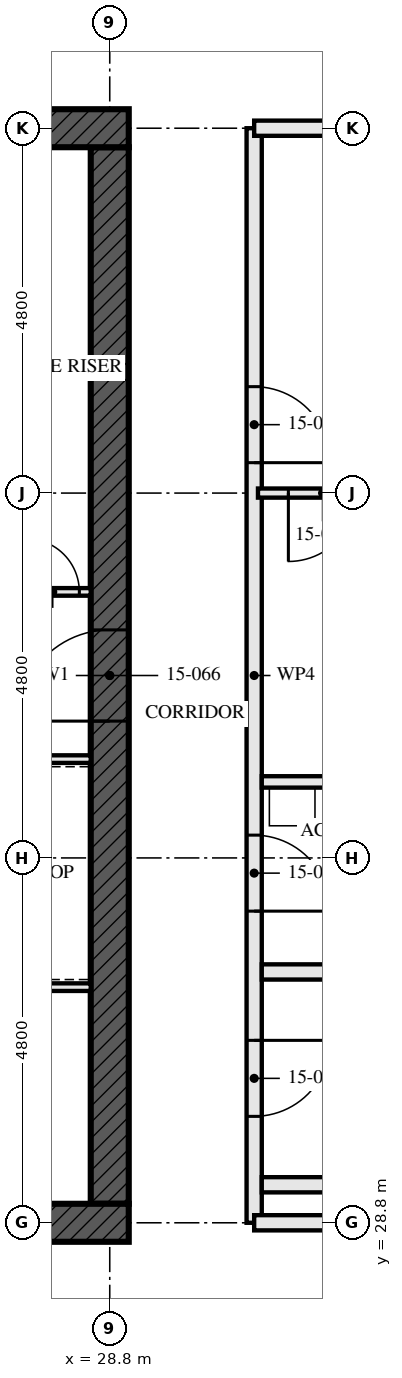
"""IFC4 building model, lengths in metres.
Left out: names, types, materials, properties, quantities, classifications, styles, units other than length and angle.
Written with IfcOpenShell. Run it as: python <this file> out.ifc"""

import sys

from ifc_helpers import new_model, si_unit, direction, frame, frame_2d, origin, place, context, subcontext, project, spatial, rectangle, extrude, element, fill, save


model = new_model("IFC4")
c1 = context("Model", 3, precision=1e-05, world=origin(), true_north=direction((0.0, 1.0)))
c2 = subcontext(c1, "Body", "Model", "MODEL_VIEW")
j1 = project(units=[si_unit("LENGTHUNIT", "METRE"), si_unit("PLANEANGLEUNIT", "RADIAN")], contexts=[c1])
p1 = place(None, origin())
s1 = spatial("IfcSite", under=j1, at=p1, CompositionType="ELEMENT")
p2 = place(p1, origin())
s2 = spatial("IfcBuilding", under=s1, at=p2, CompositionType="ELEMENT")
p3 = place(p2, frame((0.0, 0.0, 58.5)))
s3 = spatial("IfcBuildingStorey", under=s2, at=p3, CompositionType="ELEMENT", Elevation=58.5)
p4 = place(p3, frame((14.15, 28.8, -0.17), z_axis=(0.0, 0.0, 1.0), x_axis=(1.0, 0.0, 0.0)))
e1 = element("IfcWall", 1, at=p4, inside=s3, PredefinedType="SHEAR", context=c2, shape_type="SweptSolid", body=[
    extrude(rectangle(XDim=14.9, YDim=0.5, at=frame_2d((7.45, 0.0))), origin(), (0.0, 0.0, 1.0), 3.5),
])
p5 = place(p4, frame((6.85, 0.0, 0.17)))
e2 = element("IfcOpeningElement", 2, at=p5, cuts=e1, PredefinedType="OPENING", context=c2, shape_type="SweptSolid", body=[
    extrude(rectangle(XDim=1.2, YDim=2.1, at=frame_2d((0.6, 1.05))), frame((0.0, 0.26, 0.0), z_axis=(0.0, -1.0, 0.0), x_axis=(1.0, 0.0, 0.0)), (0.0, 0.0, 1.0), 0.521),
])
p6 = place(p3, frame((29.05, 43.2, -0.17), z_axis=(0.0, 0.0, 1.0), x_axis=(-1.0, 0.0, 0.0)))
e3 = element("IfcWall", 3, at=p6, inside=s3, PredefinedType="SHEAR", context=c2, shape_type="SweptSolid", body=[
    extrude(rectangle(XDim=14.9, YDim=0.5, at=frame_2d((7.45, 0.0))), origin(), (0.0, 0.0, 1.0), 3.5),
])
p7 = place(p6, frame((6.85, 0.0, 0.17)))
e4 = element("IfcOpeningElement", 4, at=p7, cuts=e3, PredefinedType="OPENING", context=c2, shape_type="SweptSolid", body=[
    extrude(rectangle(XDim=1.2, YDim=2.1, at=frame_2d((0.6, 1.05))), frame((0.0, 0.26, 0.0), z_axis=(0.0, -1.0, 0.0), x_axis=(1.0, 0.0, 0.0)), (0.0, 0.0, 1.0), 0.521),
])
p8 = place(p3, frame((28.8, 29.05, -0.17), z_axis=(0.0, 0.0, 1.0), x_axis=(0.0, 1.0, 0.0)))
e5 = element("IfcWall", 5, at=p8, inside=s3, PredefinedType="SHEAR", context=c2, shape_type="SweptSolid", body=[
    extrude(rectangle(XDim=13.9, YDim=0.5, at=frame_2d((6.95, 0.0))), origin(), (0.0, 0.0, 1.0), 3.5),
])
p9 = place(p8, frame((6.35, 0.0, 0.17)))
e6 = element("IfcOpeningElement", 6, at=p9, cuts=e5, PredefinedType="OPENING", context=c2, shape_type="SweptSolid", body=[
    extrude(rectangle(XDim=1.2, YDim=2.1, at=frame_2d((0.6, 1.05))), frame((0.0, 0.26, 0.0), z_axis=(0.0, -1.0, 0.0), x_axis=(1.0, 0.0, 0.0)), (0.0, 0.0, 1.0), 0.521),
])
for number, where, z_axis, x_axis in (
    (7, (35.5, 29.3, 0.0), (0.0, 0.0, 1.0), (-1.0, 0.0, 0.0)),
    (8, (35.5, 32.1, 0.0), (0.0, 0.0, 1.0), (-1.0, 0.0, 0.0)),
):
    element("IfcWall", number, at=place(p3, frame(where, z_axis=z_axis, x_axis=x_axis)), inside=s3, PredefinedType="SOLIDWALL", context=c2, shape_type="SweptSolid", body=[
        extrude(rectangle(XDim=4.7, YDim=0.2, at=frame_2d((2.35, 0.0))), origin(), (0.0, 0.0, 1.0), 2.99),
    ])
p10 = place(p3, frame((33.8, 34.6, 0.0), z_axis=(0.0, 0.0, 1.0), x_axis=(-1.0, 0.0, 0.0)))
e9 = element("IfcWall", 9, at=p10, inside=s3, PredefinedType="PARTITIONING", context=c2, shape_type="SweptSolid", body=[
    extrude(rectangle(XDim=3.0, YDim=0.15, at=frame_2d((1.5, 0.0))), origin(), (0.0, 0.0, 1.0), 3.33),
])
p11 = place(p3, frame((35.4, 38.4, 0.0), z_axis=(0.0, 0.0, 1.0), x_axis=(-1.0, 0.0, 0.0)))
e10 = element("IfcWall", 10, at=p11, inside=s3, PredefinedType="PARTITIONING", context=c2, shape_type="SweptSolid", body=[
    extrude(rectangle(XDim=4.65, YDim=0.12, at=frame_2d((2.325, 0.0))), origin(), (0.0, 0.0, 1.0), 2.55),
])
p12 = place(p11, frame((3.35, 0.0, 0.0)))
e11 = element("IfcOpeningElement", 11, at=p12, cuts=e10, PredefinedType="OPENING", context=c2, shape_type="SweptSolid", body=[
    extrude(rectangle(XDim=0.9, YDim=2.1, at=frame_2d((0.45, 1.05))), frame((0.0, 0.071, 0.0), z_axis=(0.0, -1.0, 0.0), x_axis=(1.0, 0.0, 0.0)), (0.0, 0.0, 1.0), 0.141),
])
p13 = place(p3, frame((30.7, 28.8, 0.0), z_axis=(0.0, 0.0, 1.0), x_axis=(0.0, 1.0, 0.0)))
e12 = element("IfcWall", 12, at=p13, inside=s3, PredefinedType="PARTITIONING", context=c2, shape_type="SweptSolid", body=[
    extrude(rectangle(XDim=14.4, YDim=0.2, at=frame_2d((7.2, 0.0))), origin(), (0.0, 0.0, 1.0), 2.55),
])
p14 = place(p13, frame((1.4, 0.0, 0.0)))
e13 = element("IfcOpeningElement", 13, at=p14, cuts=e12, PredefinedType="OPENING", context=c2, shape_type="SweptSolid", body=[
    extrude(rectangle(XDim=1.0, YDim=2.1, at=frame_2d((0.5, 1.05))), frame((0.0, 0.111, 0.0), z_axis=(0.0, -1.0, 0.0), x_axis=(1.0, 0.0, 0.0)), (0.0, 0.0, 1.0), 0.221),
])
p15 = place(p13, frame((4.1, 0.0, 0.0)))
e14 = element("IfcOpeningElement", 14, at=p15, cuts=e12, PredefinedType="OPENING", context=c2, shape_type="SweptSolid", body=[
    extrude(rectangle(XDim=1.0, YDim=2.1, at=frame_2d((0.5, 1.05))), frame((0.0, 0.111, 0.0), z_axis=(0.0, -1.0, 0.0), x_axis=(1.0, 0.0, 0.0)), (0.0, 0.0, 1.0), 0.221),
])
p16 = place(p13, frame((10.0, 0.0, 0.0)))
e15 = element("IfcOpeningElement", 15, at=p16, cuts=e12, PredefinedType="OPENING", context=c2, shape_type="SweptSolid", body=[
    extrude(rectangle(XDim=1.0, YDim=2.1, at=frame_2d((0.5, 1.05))), frame((0.0, 0.111, 0.0), z_axis=(0.0, -1.0, 0.0), x_axis=(1.0, 0.0, 0.0)), (0.0, 0.0, 1.0), 0.221),
])
p17 = place(p3, frame((23.05, 34.9, 0.0), z_axis=(0.0, 0.0, 1.0), x_axis=(1.0, 0.0, 0.0)))
e16 = element("IfcWall", 16, at=p17, inside=s3, PredefinedType="SOLIDWALL", context=c2, shape_type="SweptSolid", body=[
    extrude(rectangle(XDim=5.5, YDim=0.1, at=frame_2d((2.75, 0.0))), origin(), (0.0, 0.0, 1.0), 3.33),
])
p18 = place(p3, frame((22.65, 37.1, 0.0), z_axis=(0.0, 0.0, 1.0), x_axis=(1.0, 0.0, 0.0)))
e17 = element("IfcWall", 17, at=p18, inside=s3, PredefinedType="SOLIDWALL", context=c2, shape_type="SweptSolid", body=[
    extrude(rectangle(XDim=5.9, YDim=0.1, at=frame_2d((2.95, 0.0))), origin(), (0.0, 0.0, 1.0), 3.33),
])
p19 = place(p18, frame((3.5, 0.0, 0.0)))
e18 = element("IfcOpeningElement", 18, at=p19, cuts=e17, PredefinedType="OPENING", context=c2, shape_type="SweptSolid", body=[
    extrude(rectangle(XDim=0.9, YDim=2.1, at=frame_2d((0.45, 1.05))), frame((0.0, 0.061, 0.0), z_axis=(0.0, -1.0, 0.0), x_axis=(1.0, 0.0, 0.0)), (0.0, 0.0, 1.0), 0.121),
])
p20 = place(p18, frame((5.05, 0.0, 0.0)))
e19 = element("IfcOpeningElement", 19, at=p20, cuts=e17, PredefinedType="OPENING", context=c2, shape_type="SweptSolid", body=[
    extrude(rectangle(XDim=0.7, YDim=2.1, at=frame_2d((0.35, 1.05))), frame((0.0, 0.061, 0.0), z_axis=(0.0, -1.0, 0.0), x_axis=(1.0, 0.0, 0.0)), (0.0, 0.0, 1.0), 0.121),
])
p21 = place(p3, frame((23.15, 31.9, 0.0), z_axis=(0.0, 0.0, 1.0), x_axis=(1.0, 0.0, 0.0)))
e20 = element("IfcWall", 20, at=p21, inside=s3, PredefinedType="SOLIDWALL", context=c2, shape_type="SweptSolid", body=[
    extrude(rectangle(XDim=5.4, YDim=0.1, at=frame_2d((2.7, 0.0))), origin(), (0.0, 0.0, 1.0), 3.33),
])
for number, where, z_axis, x_axis in (
    (21, (33.205, 28.8, 0.0), (0.0, 0.0, 1.0), (-1.0, 0.0, 0.0)),
    (22, (33.205, 43.2, 0.0), (0.0, 0.0, 1.0), (-1.0, 0.0, 0.0)),
):
    element("IfcWall", number, at=place(p3, frame(where, z_axis=z_axis, x_axis=x_axis)), inside=s3, PredefinedType="PARTITIONING", context=c2, shape_type="SweptSolid", body=[
        extrude(rectangle(XDim=2.505, YDim=0.2, at=frame_2d((1.252, 0.0))), origin(), (0.0, 0.0, 1.0), 2.32),
    ])
p22 = place(p12, origin())
e23 = element("IfcDoor", 23, at=p22, inside=s3, OperationType="SINGLE_SWING_LEFT", PredefinedType="DOOR", context=c2, shape_type="SweptSolid", body=[
    extrude(rectangle(XDim=0.9, YDim=2.1, at=frame_2d((0.45, 1.05))), frame((0.0, 0.022, 0.0), z_axis=(0.0, -1.0, 0.0), x_axis=(1.0, 0.0, 0.0)), (0.0, 0.0, 1.0), 0.044),
])
fill(e11, e23)
p23 = place(p14, frame((1.0, 0.0, 0.0), z_axis=(0.0, 0.0, 1.0), x_axis=(-1.0, 0.0, 0.0)))
e24 = element("IfcDoor", 24, at=p23, inside=s3, OperationType="SINGLE_SWING_RIGHT", PredefinedType="DOOR", context=c2, shape_type="SweptSolid", body=[
    extrude(rectangle(XDim=1.0, YDim=2.1, at=frame_2d((0.5, 1.05))), frame((0.0, 0.032, 0.0), z_axis=(0.0, -1.0, 0.0), x_axis=(1.0, 0.0, 0.0)), (0.0, 0.0, 1.0), 0.064),
])
fill(e13, e24)
p24 = place(p15, frame((1.0, 0.0, 0.0), z_axis=(0.0, 0.0, 1.0), x_axis=(-1.0, 0.0, 0.0)))
e25 = element("IfcDoor", 25, at=p24, inside=s3, OperationType="SINGLE_SWING_LEFT", PredefinedType="DOOR", context=c2, shape_type="SweptSolid", body=[
    extrude(rectangle(XDim=1.0, YDim=2.1, at=frame_2d((0.5, 1.05))), frame((0.0, 0.027, 0.0), z_axis=(0.0, -1.0, 0.0), x_axis=(1.0, 0.0, 0.0)), (0.0, 0.0, 1.0), 0.054),
])
fill(e14, e25)
p25 = place(p16, frame((1.0, 0.0, 0.0), z_axis=(0.0, 0.0, 1.0), x_axis=(-1.0, 0.0, 0.0)))
e26 = element("IfcDoor", 26, at=p25, inside=s3, OperationType="SINGLE_SWING_LEFT", PredefinedType="DOOR", context=c2, shape_type="SweptSolid", body=[
    extrude(rectangle(XDim=1.0, YDim=2.1, at=frame_2d((0.5, 1.05))), frame((0.0, 0.027, 0.0), z_axis=(0.0, -1.0, 0.0), x_axis=(1.0, 0.0, 0.0)), (0.0, 0.0, 1.0), 0.054),
])
fill(e15, e26)
p26 = place(p20, origin())
e27 = element("IfcDoor", 27, at=p26, inside=s3, OperationType="SINGLE_SWING_RIGHT", PredefinedType="DOOR", context=c2, shape_type="SweptSolid", body=[
    extrude(rectangle(XDim=0.7, YDim=2.1, at=frame_2d((0.35, 1.05))), frame((0.0, 0.027, 0.0), z_axis=(0.0, -1.0, 0.0), x_axis=(1.0, 0.0, 0.0)), (0.0, 0.0, 1.0), 0.054),
])
fill(e19, e27)
p27 = place(p9, origin())
e28 = element("IfcDoor", 28, at=p27, inside=s3, OperationType="SINGLE_SWING_LEFT", PredefinedType="DOOR", context=c2, shape_type="SweptSolid", body=[
    extrude(rectangle(XDim=1.2, YDim=2.1, at=frame_2d((0.6, 1.05))), frame((0.0, 0.027, 0.0), z_axis=(0.0, -1.0, 0.0), x_axis=(1.0, 0.0, 0.0)), (0.0, 0.0, 1.0), 0.054),
])
fill(e6, e28)
save(model, sys.argv[1])
